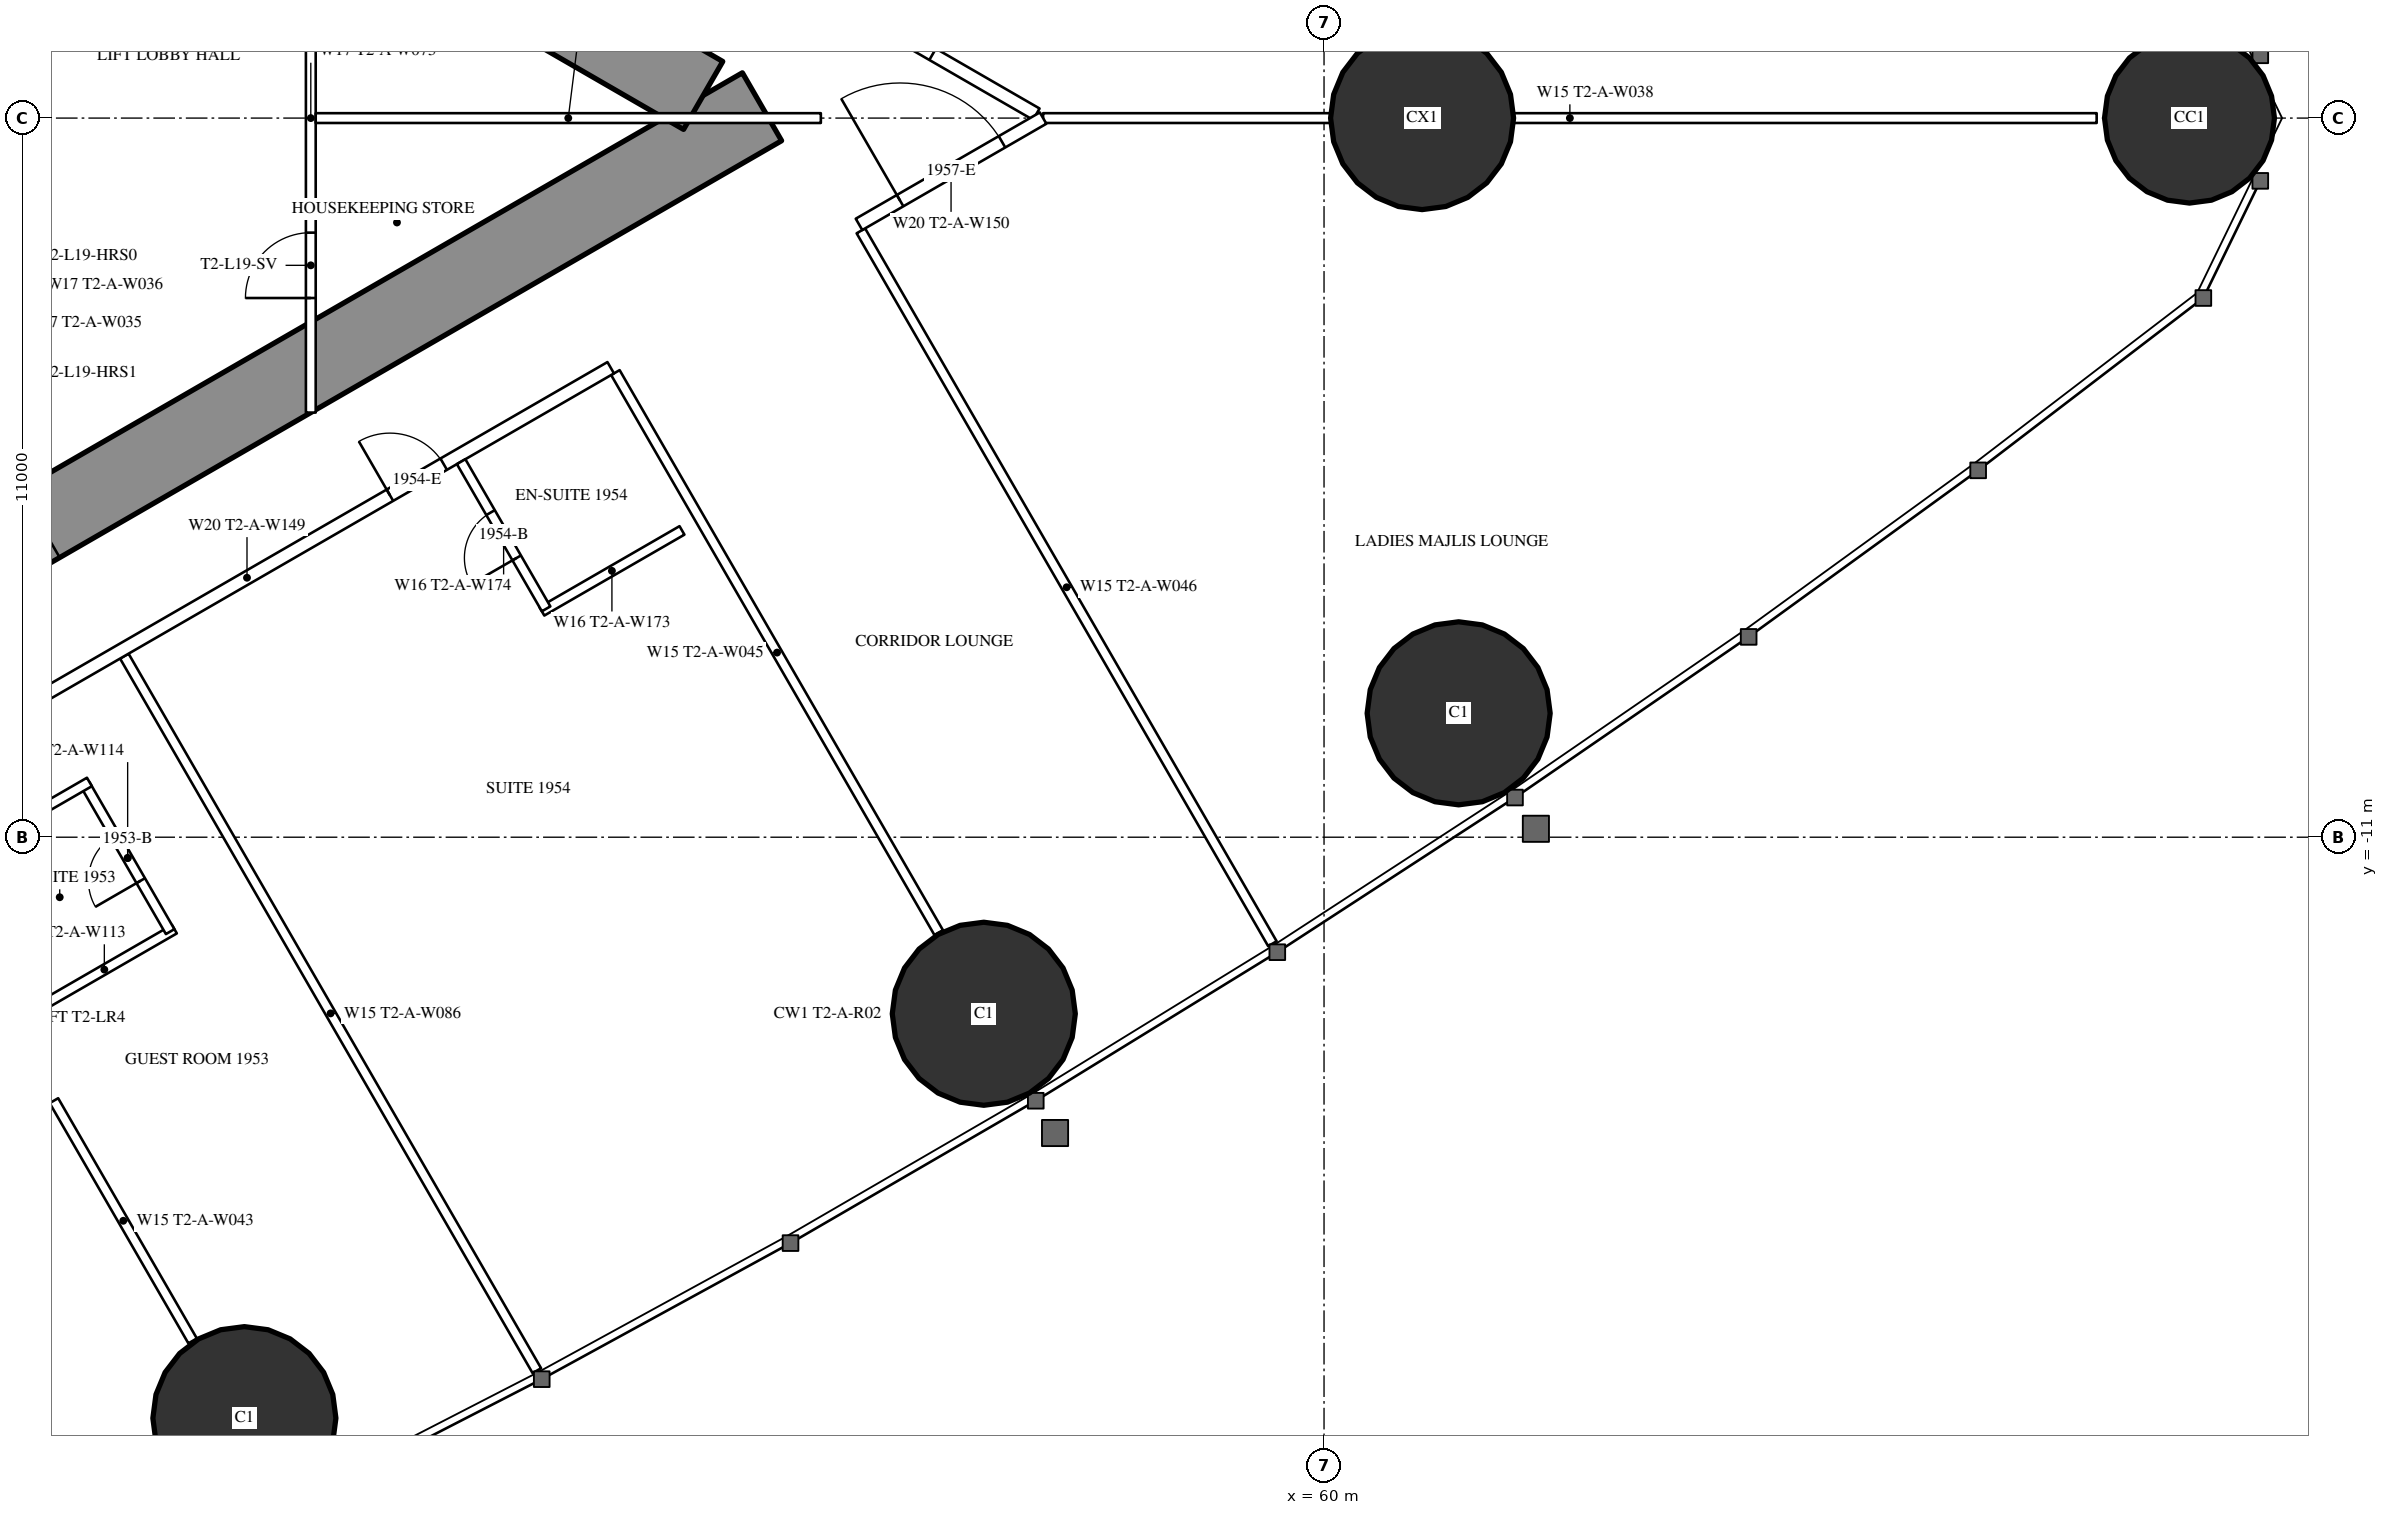
"""IFC4 building model, lengths in metres.
Left out: names, types, materials, properties, quantities, classifications, styles, units other than length and angle.
Written with IfcOpenShell. Run it as: python <this file> out.ifc"""

import sys

from ifc_helpers import new_model, si_unit, direction, frame, frame_2d, origin, origin_2d, place, context, subcontext, project, spatial, rectangle, hollow_circle, extrude, element, fill, save


model = new_model("IFC4")
c1 = context("Model", 3, precision=1e-05, world=origin(), true_north=direction((0.0, 1.0)))
c2 = subcontext(c1, "Body", "Model", "MODEL_VIEW")
j1 = project(units=[si_unit("LENGTHUNIT", "METRE"), si_unit("PLANEANGLEUNIT", "RADIAN")], contexts=[c1])
p1 = place(None, origin())
s1 = spatial("IfcSite", under=j1, at=p1, CompositionType="ELEMENT")
p2 = place(p1, origin())
s2 = spatial("IfcBuilding", under=s1, at=p2, CompositionType="ELEMENT")
p3 = place(p2, frame((0.0, 0.0, 74.0)))
s3 = spatial("IfcBuildingStorey", under=s2, at=p3, CompositionType="ELEMENT", Elevation=74.0)
p4 = place(p3, frame((73.239, 0.0, 0.0), z_axis=(0.0, 0.0, 1.0), x_axis=(1.0, 0.0, 0.0)))
e1 = element("IfcColumn", 1, at=p4, inside=s3, PredefinedType="COLUMN", context=c2, shape_type="SweptSolid", body=[
    extrude(hollow_circle(Radius=1.3, WallThickness=0.1, at=origin_2d()), origin(), (0.0, 0.0, 1.0), 3.5),
])
for number, where, z_axis, x_axis in (
    (2, (43.484, -19.886, 0.0), (0.0, 0.0, 1.0), (1.0, 0.0, 0.0)),
    (3, (54.795, -13.701, 0.0), (0.0, 0.0, 1.0), (1.0, 0.0, 0.0)),
    (4, (62.059, -9.105, 0.0), (0.0, 0.0, 1.0), (1.0, 0.0, 0.0)),
):
    element("IfcColumn", number, at=place(p3, frame(where, z_axis=z_axis, x_axis=x_axis)), inside=s3, PredefinedType="COLUMN", context=c2, shape_type="SweptSolid", body=[
        extrude(hollow_circle(Radius=1.4, WallThickness=0.12, at=origin_2d()), origin(), (0.0, 0.0, 1.0), 3.5),
    ])
p5 = place(p3, frame((61.5, 0.0, 0.0), z_axis=(0.0, 0.0, 1.0), x_axis=(1.0, 0.0, 0.0)))
e5 = element("IfcColumn", 5, at=p5, inside=s3, PredefinedType="COLUMN", context=c2, shape_type="SweptSolid", body=[
    extrude(hollow_circle(Radius=1.4, WallThickness=0.1, at=origin_2d()), origin(), (0.0, 0.0, 1.0), 3.5),
])
p6 = place(p3, frame((27.2, -13.8, 0.0), z_axis=(0.0, 0.0, 1.0), x_axis=(0.866027159892, 0.499996958321, 0.0)))
e6 = element("IfcWall", 6, at=p6, inside=s3, PredefinedType="SHEAR", context=c2, shape_type="SweptSolid", body=[
    extrude(rectangle(XDim=27.947, YDim=1.2, at=frame_2d((13.973, 0.0))), origin(), (0.0, 0.0, 1.0), 3.5),
])
p7 = place(p6, frame((4.6, 0.0, 0.0)))
e7 = element("IfcOpeningElement", 7, at=p7, cuts=e6, PredefinedType="OPENING", context=c2, shape_type="SweptSolid", body=[
    extrude(rectangle(XDim=1.0, YDim=2.2, at=frame_2d((0.5, 1.1))), frame((0.0, 0.61, 0.0), z_axis=(0.0, -1.0, 0.0), x_axis=(1.0, 0.0, 0.0)), (0.0, 0.0, 1.0), 1.22),
])
p8 = place(p6, frame((13.395, 0.0, 0.0)))
e8 = element("IfcOpeningElement", 8, at=p8, cuts=e6, PredefinedType="OPENING", context=c2, shape_type="SweptSolid", body=[
    extrude(rectangle(XDim=1.8, YDim=2.2, at=frame_2d((0.9, 1.1))), frame((0.0, 0.61, 0.0), z_axis=(0.0, -1.0, 0.0), x_axis=(1.0, 0.0, 0.0)), (0.0, 0.0, 1.0), 1.22),
])
p9 = place(p3, frame((27.2, 13.8, 0.0), z_axis=(0.0, 0.0, 1.0), x_axis=(0.866024515034, -0.500001539357, 0.0)))
e9 = element("IfcWall", 9, at=p9, inside=s3, PredefinedType="SHEAR", context=c2, shape_type="SweptSolid", body=[
    extrude(rectangle(XDim=26.907, YDim=1.2, at=frame_2d((13.454, 0.0))), origin(), (0.0, 0.0, 1.0), 3.5),
])
p10 = place(p9, frame((4.6, 0.0, 0.0)))
e10 = element("IfcOpeningElement", 10, at=p10, cuts=e9, PredefinedType="OPENING", context=c2, shape_type="SweptSolid", body=[
    extrude(rectangle(XDim=1.0, YDim=2.2, at=frame_2d((0.5, 1.1))), frame((0.0, 0.61, 0.0), z_axis=(0.0, -1.0, 0.0), x_axis=(1.0, 0.0, 0.0)), (0.0, 0.0, 1.0), 1.22),
])
p11 = place(p9, frame((13.395, 0.0, 0.0)))
e11 = element("IfcOpeningElement", 11, at=p11, cuts=e9, PredefinedType="OPENING", context=c2, shape_type="SweptSolid", body=[
    extrude(rectangle(XDim=1.8, YDim=2.2, at=frame_2d((0.9, 1.1))), frame((0.0, 0.61, 0.0), z_axis=(0.0, -1.0, 0.0), x_axis=(1.0, 0.0, 0.0)), (0.0, 0.0, 1.0), 1.22),
])
p12 = place(p3, frame((41.647, -8.23, 0.0), z_axis=(0.0, 0.0, 1.0), x_axis=(0.49998590462, -0.866033541603, 0.0)))
e12 = element("IfcWall", 12, at=p12, inside=s3, PredefinedType="PARTITIONING", context=c2, shape_type="SweptSolid", body=[
    extrude(rectangle(XDim=12.621, YDim=0.15, at=frame_2d((6.311, 0.0))), origin(), (0.0, 0.0, 1.0), 3.25),
])
p13 = place(p3, frame((49.159, -3.893, 0.0), z_axis=(0.0, 0.0, 1.0), x_axis=(0.499998773722, -0.866026111775, 0.0)))
e13 = element("IfcWall", 13, at=p13, inside=s3, PredefinedType="PARTITIONING", context=c2, shape_type="SweptSolid", body=[
    extrude(rectangle(XDim=9.892, YDim=0.15, at=frame_2d((4.946, 0.0))), origin(), (0.0, 0.0, 1.0), 2.25),
])
p14 = place(p3, frame((52.915, -1.725, 0.0), z_axis=(0.0, 0.0, 1.0), x_axis=(0.499997163113, -0.866027041656, 0.0)))
e14 = element("IfcWall", 14, at=p14, inside=s3, PredefinedType="PARTITIONING", context=c2, shape_type="SweptSolid", body=[
    extrude(rectangle(XDim=12.591, YDim=0.15, at=frame_2d((6.295, 0.0))), origin(), (0.0, 0.0, 1.0), 3.25),
])
p15 = place(p3, frame((55.702, 0.0, 0.0), z_axis=(0.0, 0.0, 1.0), x_axis=(1.0, 0.0, 0.0)))
e15 = element("IfcWall", 15, at=p15, inside=s3, PredefinedType="PARTITIONING", context=c2, shape_type="SweptSolid", body=[
    extrude(rectangle(XDim=16.117, YDim=0.15, at=frame_2d((8.059, 0.0))), origin(), (0.0, 0.0, 1.0), 2.25),
])
p16 = place(p3, frame((40.57, -15.03, 0.0), z_axis=(0.0, 0.0, 1.0), x_axis=(0.500012993597, -0.866017901798, 0.0)))
e16 = element("IfcWall", 16, at=p16, inside=s3, PredefinedType="PARTITIONING", context=c2, shape_type="SweptSolid", body=[
    extrude(rectangle(XDim=4.243, YDim=0.15, at=frame_2d((2.122, 0.0))), origin(), (0.0, 0.0, 1.0), 3.25),
])
p17 = place(p3, frame((36.834, 10.894, 0.0), z_axis=(0.0, 0.0, 1.0), x_axis=(0.866028157229, -0.499995230863, 0.0)))
e17 = element("IfcWall", 17, at=p17, inside=s3, PredefinedType="PARTITIONING", context=c2, shape_type="SweptSolid", body=[
    extrude(rectangle(XDim=21.667, YDim=0.2, at=frame_2d((10.833, 0.0))), origin(), (0.0, 0.0, 1.0), 3.25),
])
p18 = place(p17, frame((18.885, 0.0, 0.0)))
e18 = element("IfcOpeningElement", 18, at=p18, cuts=e17, PredefinedType="OPENING", context=c2, shape_type="SweptSolid", body=[
    extrude(rectangle(XDim=0.95, YDim=2.2, at=frame_2d((0.475, 1.1))), frame((0.0, 0.11, 0.0), z_axis=(0.0, -1.0, 0.0), x_axis=(1.0, 0.0, 0.0)), (0.0, 0.0, 1.0), 0.22),
])
p19 = place(p17, frame((15.443, 0.0, 0.0)))
e19 = element("IfcOpeningElement", 19, at=p19, cuts=e17, PredefinedType="OPENING", context=c2, shape_type="SweptSolid", body=[
    extrude(rectangle(XDim=1.8, YDim=2.2, at=frame_2d((0.9, 1.1))), frame((0.0, 0.11, 0.0), z_axis=(0.0, -1.0, 0.0), x_axis=(1.0, 0.0, 0.0)), (0.0, 0.0, 1.0), 0.22),
])
p20 = place(p17, frame((12.562, 0.0, 0.0)))
e20 = element("IfcOpeningElement", 20, at=p20, cuts=e17, PredefinedType="OPENING", context=c2, shape_type="SweptSolid", body=[
    extrude(rectangle(XDim=0.95, YDim=2.2, at=frame_2d((0.475, 1.1))), frame((0.0, 0.11, 0.0), z_axis=(0.0, -1.0, 0.0), x_axis=(1.0, 0.0, 0.0)), (0.0, 0.0, 1.0), 0.22),
])
p21 = place(p17, frame((4.292, 0.0, 0.0)))
e21 = element("IfcOpeningElement", 21, at=p21, cuts=e17, PredefinedType="OPENING", context=c2, shape_type="SweptSolid", body=[
    extrude(rectangle(XDim=1.0, YDim=2.2, at=frame_2d((0.5, 1.1))), frame((0.0, 0.11, 0.0), z_axis=(0.0, -1.0, 0.0), x_axis=(1.0, 0.0, 0.0)), (0.0, 0.0, 1.0), 0.22),
])
p22 = place(p3, frame((37.96, -10.243, 0.0), z_axis=(0.0, 0.0, 1.0), x_axis=(0.866030548046, 0.499991089772, 0.0)))
e22 = element("IfcWall", 22, at=p22, inside=s3, PredefinedType="PARTITIONING", context=c2, shape_type="SweptSolid", body=[
    extrude(rectangle(XDim=12.849, YDim=0.2, at=frame_2d((6.425, 0.0))), origin(), (0.0, 0.0, 1.0), 3.25),
])
p23 = place(p22, frame((8.949, 0.0, 0.0)))
e23 = element("IfcOpeningElement", 23, at=p23, cuts=e22, PredefinedType="OPENING", context=c2, shape_type="SweptSolid", body=[
    extrude(rectangle(XDim=0.95, YDim=2.2, at=frame_2d((0.475, 1.1))), frame((0.0, 0.11, 0.0), z_axis=(0.0, -1.0, 0.0), x_axis=(1.0, 0.0, 0.0)), (0.0, 0.0, 1.0), 0.22),
])
p24 = place(p22, frame((0.6, 0.0, 0.0)))
e24 = element("IfcOpeningElement", 24, at=p24, cuts=e22, PredefinedType="OPENING", context=c2, shape_type="SweptSolid", body=[
    extrude(rectangle(XDim=0.95, YDim=2.2, at=frame_2d((0.475, 1.1))), frame((0.0, 0.11, 0.0), z_axis=(0.0, -1.0, 0.0), x_axis=(1.0, 0.0, 0.0)), (0.0, 0.0, 1.0), 0.22),
])
p25 = place(p3, frame((52.886, -1.626, 0.0), z_axis=(0.0, 0.0, 1.0), x_axis=(0.866030540913, 0.499991102127, 0.0)))
e25 = element("IfcWall", 25, at=p25, inside=s3, PredefinedType="PARTITIONING", context=c2, shape_type="SweptSolid", body=[
    extrude(rectangle(XDim=3.251, YDim=0.2, at=frame_2d((1.626, 0.0))), origin(), (0.0, 0.0, 1.0), 3.25),
])
p26 = place(p25, frame((0.726, 0.0, 0.0)))
e26 = element("IfcOpeningElement", 26, at=p26, cuts=e25, PredefinedType="OPENING", context=c2, shape_type="SweptSolid", body=[
    extrude(rectangle(XDim=1.8, YDim=2.2, at=frame_2d((0.9, 1.1))), frame((0.0, 0.11, 0.0), z_axis=(0.0, -1.0, 0.0), x_axis=(1.0, 0.0, 0.0)), (0.0, 0.0, 1.0), 0.22),
])
p27 = place(p3, frame((48.035, -7.545, 0.0), z_axis=(0.0, 0.0, 1.0), x_axis=(0.866006523861, 0.500032699561, 0.0)))
e27 = element("IfcWall", 27, at=p27, inside=s3, PredefinedType="PARTITIONING", context=c2, shape_type="SweptSolid", body=[
    extrude(rectangle(XDim=2.475, YDim=0.15, at=frame_2d((1.237, 0.0))), origin(), (0.0, 0.0, 1.0), 3.25),
])
p28 = place(p3, frame((46.8, -5.255, 0.0), z_axis=(0.0, 0.0, 1.0), x_axis=(0.500006934395, -0.866021400173, 0.0)))
e28 = element("IfcWall", 28, at=p28, inside=s3, PredefinedType="PARTITIONING", context=c2, shape_type="SweptSolid", body=[
    extrude(rectangle(XDim=2.6, YDim=0.15, at=frame_2d((1.3, 0.0))), origin(), (0.0, 0.0, 1.0), 3.25),
])
p29 = place(p28, frame((0.9, 0.0, 0.0)))
e29 = element("IfcOpeningElement", 29, at=p29, cuts=e28, PredefinedType="OPENING", context=c2, shape_type="SweptSolid", body=[
    extrude(rectangle(XDim=0.8, YDim=2.2, at=frame_2d((0.4, 1.1))), frame((0.0, 0.085, 0.0), z_axis=(0.0, -1.0, 0.0), x_axis=(1.0, 0.0, 0.0)), (0.0, 0.0, 1.0), 0.17),
])
p30 = place(p3, frame((40.27, -13.644, 0.0), z_axis=(0.0, 0.0, 1.0), x_axis=(0.866031185235, 0.4999899861, 0.0)))
e30 = element("IfcWall", 30, at=p30, inside=s3, PredefinedType="PARTITIONING", context=c2, shape_type="SweptSolid", body=[
    extrude(rectangle(XDim=2.475, YDim=0.15, at=frame_2d((1.238, 0.0))), origin(), (0.0, 0.0, 1.0), 3.25),
])
p31 = place(p3, frame((41.048, -10.193, 0.0), z_axis=(0.0, 0.0, 1.0), x_axis=(0.500047596559, -0.865997922154, 0.0)))
e31 = element("IfcWall", 31, at=p31, inside=s3, PredefinedType="PARTITIONING", context=c2, shape_type="SweptSolid", body=[
    extrude(rectangle(XDim=2.6, YDim=0.15, at=frame_2d((1.3, 0.0))), origin(), (0.0, 0.0, 1.0), 3.25),
])
p32 = place(p31, frame((0.9, 0.0, 0.0)))
e32 = element("IfcOpeningElement", 32, at=p32, cuts=e31, PredefinedType="OPENING", context=c2, shape_type="SweptSolid", body=[
    extrude(rectangle(XDim=0.8, YDim=2.2, at=frame_2d((0.4, 1.1))), frame((0.0, 0.085, 0.0), z_axis=(0.0, -1.0, 0.0), x_axis=(1.0, 0.0, 0.0)), (0.0, 0.0, 1.0), 0.17),
])
p33 = place(p3, frame((38.97, -11.393, 0.0), z_axis=(0.0, 0.0, 1.0), x_axis=(0.866031185235, 0.4999899861, 0.0)))
e33 = element("IfcWall", 33, at=p33, inside=s3, PredefinedType="PARTITIONING", context=c2, shape_type="SweptSolid", body=[
    extrude(rectangle(XDim=2.475, YDim=0.15, at=frame_2d((1.238, 0.0))), origin(), (0.0, 0.0, 1.0), 3.25),
])
p34 = place(p3, frame((44.5, -4.505, 0.0), z_axis=(0.0, 0.0, 1.0), x_axis=(0.0, 1.0, 0.0)))
e34 = element("IfcWall", 34, at=p34, inside=s3, PredefinedType="PARTITIONING", context=c2, shape_type="SweptSolid", body=[
    extrude(rectangle(XDim=9.009, YDim=0.15, at=frame_2d((4.505, 0.0))), origin(), (0.0, 0.0, 1.0), 2.45),
])
p35 = place(p34, frame((1.752, 0.0, 0.0)))
e35 = element("IfcOpeningElement", 35, at=p35, cuts=e34, PredefinedType="OPENING", context=c2, shape_type="SweptSolid", body=[
    extrude(rectangle(XDim=1.0, YDim=2.2, at=frame_2d((0.5, 1.1))), frame((0.0, 0.085, 0.0), z_axis=(0.0, -1.0, 0.0), x_axis=(1.0, 0.0, 0.0)), (0.0, 0.0, 1.0), 0.17),
])
p36 = place(p34, frame((6.257, 0.0, 0.0)))
e36 = element("IfcOpeningElement", 36, at=p36, cuts=e34, PredefinedType="OPENING", context=c2, shape_type="SweptSolid", body=[
    extrude(rectangle(XDim=1.0, YDim=2.2, at=frame_2d((0.5, 1.1))), frame((0.0, 0.085, 0.0), z_axis=(0.0, -1.0, 0.0), x_axis=(1.0, 0.0, 0.0)), (0.0, 0.0, 1.0), 0.17),
])
p37 = place(p3, frame((44.575, 0.0, 0.0), z_axis=(0.0, 0.0, 1.0), x_axis=(1.0, 0.0, 0.0)))
e37 = element("IfcWall", 37, at=p37, inside=s3, PredefinedType="PARTITIONING", context=c2, shape_type="SweptSolid", body=[
    extrude(rectangle(XDim=7.727, YDim=0.15, at=frame_2d((3.864, 0.0))), origin(), (0.0, 0.0, 1.0), 2.25),
])
p38 = place(p29, origin())
e38 = element("IfcDoor", 38, at=p38, inside=s3, OperationType="SINGLE_SWING_RIGHT", PredefinedType="DOOR", context=c2, shape_type="SweptSolid", body=[
    extrude(rectangle(XDim=0.8, YDim=2.2, at=frame_2d((0.4, 1.1))), frame((0.0, 0.025, 0.0), z_axis=(0.0, -1.0, 0.0), x_axis=(1.0, 0.0, 0.0)), (0.0, 0.0, 1.0), 0.05),
])
fill(e29, e38)
p39 = place(p23, origin())
e39 = element("IfcDoor", 39, at=p39, inside=s3, OperationType="SINGLE_SWING_LEFT", PredefinedType="DOOR", context=c2, shape_type="SweptSolid", body=[
    extrude(rectangle(XDim=0.95, YDim=2.2, at=frame_2d((0.475, 1.1))), frame((0.0, 0.025, 0.0), z_axis=(0.0, -1.0, 0.0), x_axis=(1.0, 0.0, 0.0)), (0.0, 0.0, 1.0), 0.05),
])
fill(e23, e39)
p40 = place(p26, origin())
e40 = element("IfcDoor", 40, at=p40, inside=s3, OperationType="DOUBLE_DOOR_SINGLE_SWING", PredefinedType="DOOR", context=c2, shape_type="SweptSolid", body=[
    extrude(rectangle(XDim=1.8, YDim=2.2, at=frame_2d((0.9, 1.1))), frame((0.0, 0.025, 0.0), z_axis=(0.0, -1.0, 0.0), x_axis=(1.0, 0.0, 0.0)), (0.0, 0.0, 1.0), 0.05),
])
fill(e26, e40)
p41 = place(p18, origin())
e41 = element("IfcDoor", 41, at=p41, inside=s3, OperationType="SINGLE_SWING_LEFT", PredefinedType="DOOR", context=c2, shape_type="SweptSolid", body=[
    extrude(rectangle(XDim=0.95, YDim=2.2, at=frame_2d((0.475, 1.1))), frame((0.0, 0.025, 0.0), z_axis=(0.0, -1.0, 0.0), x_axis=(1.0, 0.0, 0.0)), (0.0, 0.0, 1.0), 0.05),
])
fill(e18, e41)
p42 = place(p32, origin())
e42 = element("IfcDoor", 42, at=p42, inside=s3, OperationType="SINGLE_SWING_RIGHT", PredefinedType="DOOR", context=c2, shape_type="SweptSolid", body=[
    extrude(rectangle(XDim=0.8, YDim=2.2, at=frame_2d((0.4, 1.1))), frame((0.0, 0.025, 0.0), z_axis=(0.0, -1.0, 0.0), x_axis=(1.0, 0.0, 0.0)), (0.0, 0.0, 1.0), 0.05),
])
fill(e32, e42)
p43 = place(p35, origin())
e43 = element("IfcDoor", 43, at=p43, inside=s3, OperationType="SINGLE_SWING_LEFT", PredefinedType="DOOR", context=c2, shape_type="SweptSolid", body=[
    extrude(rectangle(XDim=1.0, YDim=2.2, at=frame_2d((0.5, 1.1))), frame((0.0, 0.025, 0.0), z_axis=(0.0, -1.0, 0.0), x_axis=(1.0, 0.0, 0.0)), (0.0, 0.0, 1.0), 0.05),
])
fill(e35, e43)
save(model, sys.argv[1])
